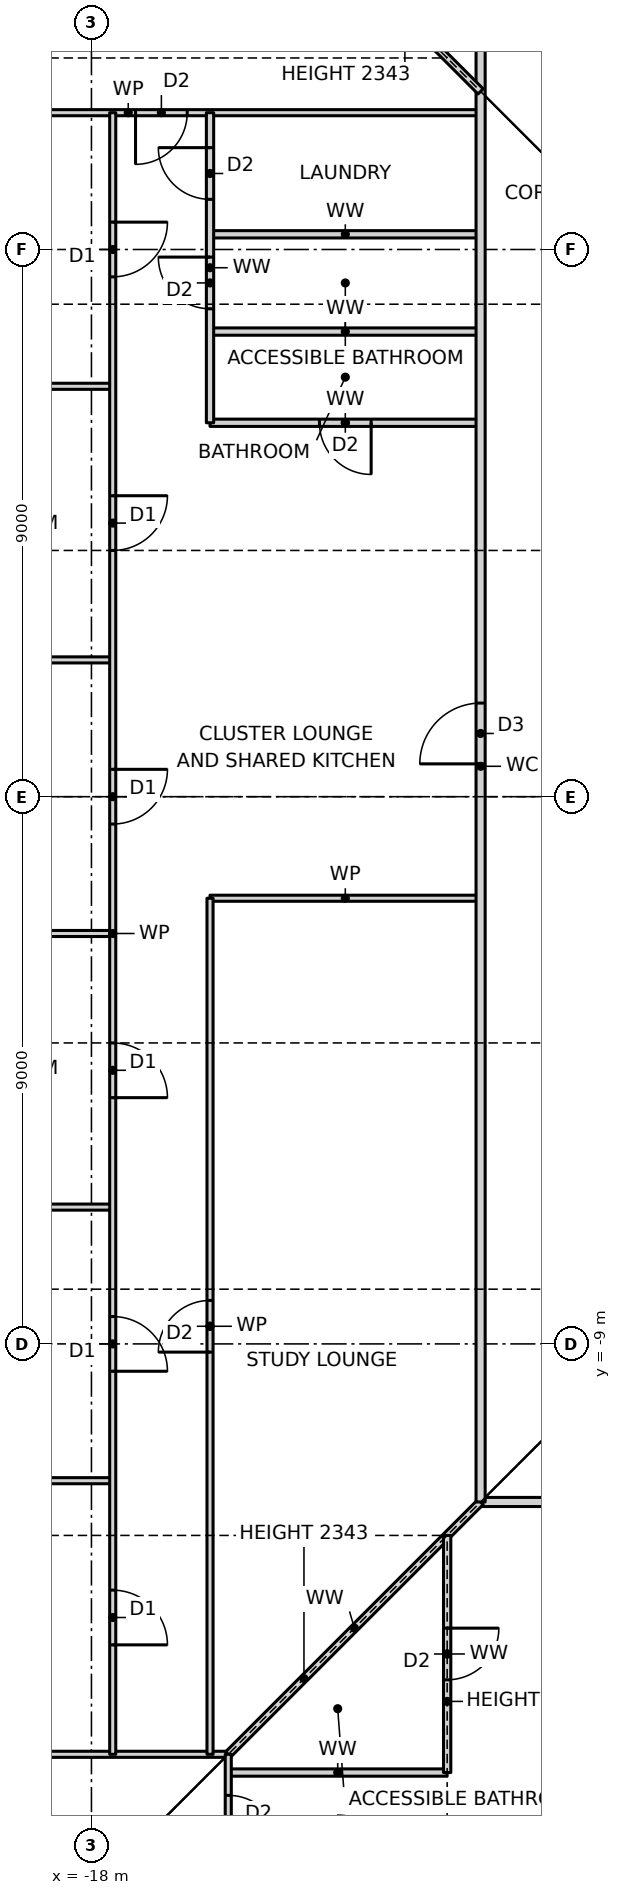
"""IFC4 building model, lengths in metres.
Left out: names, types, materials, properties, quantities, classifications, styles, units other than length and angle.
Written with IfcOpenShell. Run it as: python <this file> out.ifc"""

import sys

from ifc_helpers import new_model, si_unit, direction, frame, frame_2d, origin, place, context, subcontext, project, spatial, rectangle, extrude, element, fill, save


model = new_model("IFC4")
c1 = context("Model", 3, precision=1e-05, world=origin(), true_north=direction((0.0, 1.0)))
c2 = subcontext(c1, "Body", "Model", "MODEL_VIEW")
j1 = project(units=[si_unit("LENGTHUNIT", "METRE"), si_unit("PLANEANGLEUNIT", "RADIAN")], contexts=[c1])
p1 = place(None, origin())
s1 = spatial("IfcSite", under=j1, at=p1, CompositionType="ELEMENT")
p2 = place(p1, origin())
s2 = spatial("IfcBuilding", under=s1, at=p2, CompositionType="ELEMENT")
p3 = place(p2, frame((0.0, 0.0, 36.0)))
s3 = spatial("IfcBuildingStorey", under=s2, at=p3, CompositionType="ELEMENT", Elevation=36.0)
p4 = place(p3, frame((-15.75, -16.05, 0.0), z_axis=(0.0, 0.0, 1.0), x_axis=(1.0, 0.0, 0.0)))
e1 = element("IfcWall", 1, at=p4, inside=s3, PredefinedType="PARTITIONING", context=c2, shape_type="SweptSolid", body=[
    extrude(rectangle(XDim=3.6, YDim=0.12, at=frame_2d((1.8, 0.0))), origin(), (0.0, 0.0, 1.0), 3.27),
])
p5 = place(p3, frame((-23.19, -15.75, 0.0), z_axis=(0.0, 0.0, 1.0), x_axis=(1.0, 0.0, 0.0)))
e2 = element("IfcWall", 2, at=p5, inside=s3, PredefinedType="PARTITIONING", context=c2, shape_type="SweptSolid", body=[
    extrude(rectangle(XDim=7.44, YDim=0.1, at=frame_2d((3.72, 0.0))), origin(), (0.0, 0.0, 1.0), 3.27),
])
p6 = place(p3, frame((-11.6, -11.6, 0.0), z_axis=(0.0, 0.0, 1.0), x_axis=(1.0, 0.0, 0.0)))
e3 = element("IfcWall", 3, at=p6, inside=s3, PredefinedType="PARTITIONING", context=c2, shape_type="SweptSolid", body=[
    extrude(rectangle(XDim=23.2, YDim=0.15, at=frame_2d((11.6, 0.0))), origin(), (0.0, 0.0, 1.0), 3.27),
])
p7 = place(p6, frame((2.975, 0.0, 0.0)))
e4 = element("IfcOpeningElement", 4, at=p7, cuts=e3, PredefinedType="OPENING", context=c2, shape_type="SweptSolid", body=[
    extrude(rectangle(XDim=1.0, YDim=2.1, at=frame_2d((0.5, 1.05))), frame((0.0, 0.085, 0.0), z_axis=(0.0, -1.0, 0.0), x_axis=(1.0, 0.0, 0.0)), (0.0, 0.0, 1.0), 0.17),
])
p8 = place(p6, frame((18.6, 0.0, 0.0)))
e5 = element("IfcOpeningElement", 5, at=p8, cuts=e3, PredefinedType="OPENING", context=c2, shape_type="SweptSolid", body=[
    extrude(rectangle(XDim=1.0, YDim=2.1, at=frame_2d((0.5, 1.05))), frame((0.0, 0.085, 0.0), z_axis=(0.0, -1.0, 0.0), x_axis=(1.0, 0.0, 0.0)), (0.0, 0.0, 1.0), 0.17),
])
for number, where, z_axis, x_axis in (
    (6, (-23.19, -11.25, 0.0), (0.0, 0.0, 1.0), (1.0, 0.0, 0.0)),
    (7, (-23.19, -6.75, 0.0), (0.0, 0.0, 1.0), (1.0, 0.0, 0.0)),
    (8, (-23.19, -2.25, 0.0), (0.0, 0.0, 1.0), (1.0, 0.0, 0.0)),
):
    element("IfcWall", number, at=place(p3, frame(where, z_axis=z_axis, x_axis=x_axis)), inside=s3, PredefinedType="PARTITIONING", context=c2, shape_type="SweptSolid", body=[
        extrude(rectangle(XDim=5.54, YDim=0.1, at=frame_2d((2.77, 0.0))), origin(), (0.0, 0.0, 1.0), 3.27),
    ])
p9 = place(p3, frame((-16.05, -1.67, 0.0), z_axis=(0.0, 0.0, 1.0), x_axis=(1.0, 0.0, 0.0)))
e9 = element("IfcWall", 9, at=p9, inside=s3, PredefinedType="PARTITIONING", context=c2, shape_type="SweptSolid", body=[
    extrude(rectangle(XDim=4.45, YDim=0.1, at=frame_2d((2.225, 0.0))), origin(), (0.0, 0.0, 1.0), 3.27),
])
p10 = place(p3, frame((-23.19, 2.25, 0.0), z_axis=(0.0, 0.0, 1.0), x_axis=(1.0, 0.0, 0.0)))
e10 = element("IfcWall", 10, at=p10, inside=s3, PredefinedType="PARTITIONING", context=c2, shape_type="SweptSolid", body=[
    extrude(rectangle(XDim=5.54, YDim=0.1, at=frame_2d((2.77, 0.0))), origin(), (0.0, 0.0, 1.0), 3.27),
])
p11 = place(p3, frame((-16.05, 6.15, 0.0), z_axis=(0.0, 0.0, 1.0), x_axis=(1.0, 0.0, 0.0)))
e11 = element("IfcWall", 11, at=p11, inside=s3, PredefinedType="PARTITIONING", context=c2, shape_type="SweptSolid", body=[
    extrude(rectangle(XDim=4.45, YDim=0.12, at=frame_2d((2.225, 0.0))), origin(), (0.0, 0.0, 1.0), 3.27),
])
p12 = place(p11, frame((1.8, 0.0, 0.0)))
e12 = element("IfcOpeningElement", 12, at=p12, cuts=e11, PredefinedType="OPENING", context=c2, shape_type="SweptSolid", body=[
    extrude(rectangle(XDim=0.85, YDim=2.1, at=frame_2d((0.425, 1.05))), frame((0.0, 0.07, 0.0), z_axis=(0.0, -1.0, 0.0), x_axis=(1.0, 0.0, 0.0)), (0.0, 0.0, 1.0), 0.14),
])
p13 = place(p3, frame((-23.19, 6.75, 0.0), z_axis=(0.0, 0.0, 1.0), x_axis=(1.0, 0.0, 0.0)))
e13 = element("IfcWall", 13, at=p13, inside=s3, PredefinedType="PARTITIONING", context=c2, shape_type="SweptSolid", body=[
    extrude(rectangle(XDim=5.54, YDim=0.1, at=frame_2d((2.77, 0.0))), origin(), (0.0, 0.0, 1.0), 3.27),
])
for number, where, z_axis, x_axis in (
    (14, (-16.05, 7.65, 0.0), (0.0, 0.0, 1.0), (1.0, 0.0, 0.0)),
    (15, (-16.05, 9.25, 0.0), (0.0, 0.0, 1.0), (1.0, 0.0, 0.0)),
):
    element("IfcWall", number, at=place(p3, frame(where, z_axis=z_axis, x_axis=x_axis)), inside=s3, PredefinedType="PARTITIONING", context=c2, shape_type="SweptSolid", body=[
        extrude(rectangle(XDim=4.45, YDim=0.12, at=frame_2d((2.225, 0.0))), origin(), (0.0, 0.0, 1.0), 3.27),
    ])
p14 = place(p3, frame((-23.19, 11.25, 0.0), z_axis=(0.0, 0.0, 1.0), x_axis=(1.0, 0.0, 0.0)))
e16 = element("IfcWall", 16, at=p14, inside=s3, PredefinedType="PARTITIONING", context=c2, shape_type="SweptSolid", body=[
    extrude(rectangle(XDim=11.59, YDim=0.1, at=frame_2d((5.795, 0.0))), origin(), (0.0, 0.0, 1.0), 3.27),
])
p15 = place(p14, frame((5.915, 0.0, 0.0)))
e17 = element("IfcOpeningElement", 17, at=p15, cuts=e16, PredefinedType="OPENING", context=c2, shape_type="SweptSolid", body=[
    extrude(rectangle(XDim=0.85, YDim=2.1, at=frame_2d((0.425, 1.05))), frame((0.0, 0.06, 0.0), z_axis=(0.0, -1.0, 0.0), x_axis=(1.0, 0.0, 0.0)), (0.0, 0.0, 1.0), 0.12),
])
p16 = place(p3, frame((-15.75, -15.75, 0.0), z_axis=(0.0, 0.0, 1.0), x_axis=(0.707106781187, 0.707106781187, 0.0)))
e18 = element("IfcWall", 18, at=p16, inside=s3, PredefinedType="PARTITIONING", context=c2, shape_type="SweptSolid", body=[
    extrude(rectangle(XDim=5.869, YDim=0.12, at=frame_2d((2.935, 0.0))), origin(), (0.0, 0.0, 1.0), 2.343),
])
p17 = place(p3, frame((-11.6, -11.6, 0.0), z_axis=(0.0, 0.0, 1.0), x_axis=(0.0, 1.0, 0.0)))
e19 = element("IfcWall", 19, at=p17, inside=s3, PredefinedType="PARTITIONING", context=c2, shape_type="SweptSolid", body=[
    extrude(rectangle(XDim=24.2, YDim=0.15, at=frame_2d((12.1, 0.0))), origin(), (0.0, 0.0, 1.0), 3.27),
])
p18 = place(p17, frame((12.14, 0.0, 0.0)))
e20 = element("IfcOpeningElement", 20, at=p18, cuts=e19, PredefinedType="OPENING", context=c2, shape_type="SweptSolid", body=[
    extrude(rectangle(XDim=1.0, YDim=2.1, at=frame_2d((0.5, 1.05))), frame((0.0, 0.085, 0.0), z_axis=(0.0, -1.0, 0.0), x_axis=(1.0, 0.0, 0.0)), (0.0, 0.0, 1.0), 0.17),
])
p19 = place(p3, frame((-12.15, -16.05, 0.0), z_axis=(0.0, 0.0, 1.0), x_axis=(0.0, 1.0, 0.0)))
e21 = element("IfcWall", 21, at=p19, inside=s3, PredefinedType="PARTITIONING", context=c2, shape_type="SweptSolid", body=[
    extrude(rectangle(XDim=3.9, YDim=0.12, at=frame_2d((1.95, 0.0))), origin(), (0.0, 0.0, 1.0), 2.508),
])
p20 = place(p19, frame((1.525, 0.0, 0.0)))
e22 = element("IfcOpeningElement", 22, at=p20, cuts=e21, PredefinedType="OPENING", context=c2, shape_type="SweptSolid", body=[
    extrude(rectangle(XDim=0.85, YDim=2.1, at=frame_2d((0.425, 1.05))), frame((0.0, 0.07, 0.0), z_axis=(0.0, -1.0, 0.0), x_axis=(1.0, 0.0, 0.0)), (0.0, 0.0, 1.0), 0.14),
])
p21 = place(p3, frame((-15.75, -23.19, 0.0), z_axis=(0.0, 0.0, 1.0), x_axis=(0.0, 1.0, 0.0)))
e23 = element("IfcWall", 23, at=p21, inside=s3, PredefinedType="PARTITIONING", context=c2, shape_type="SweptSolid", body=[
    extrude(rectangle(XDim=7.44, YDim=0.1, at=frame_2d((3.72, 0.0))), origin(), (0.0, 0.0, 1.0), 3.27),
])
p22 = place(p21, frame((5.915, 0.0, 0.0)))
e24 = element("IfcOpeningElement", 24, at=p22, cuts=e23, PredefinedType="OPENING", context=c2, shape_type="SweptSolid", body=[
    extrude(rectangle(XDim=0.85, YDim=2.1, at=frame_2d((0.425, 1.05))), frame((0.0, 0.06, 0.0), z_axis=(0.0, -1.0, 0.0), x_axis=(1.0, 0.0, 0.0)), (0.0, 0.0, 1.0), 0.12),
])
p23 = place(p3, frame((-16.05, -15.75, 0.0), z_axis=(0.0, 0.0, 1.0), x_axis=(0.0, 1.0, 0.0)))
e25 = element("IfcWall", 25, at=p23, inside=s3, PredefinedType="PARTITIONING", context=c2, shape_type="SweptSolid", body=[
    extrude(rectangle(XDim=14.08, YDim=0.1, at=frame_2d((7.04, 0.0))), origin(), (0.0, 0.0, 1.0), 3.27),
])
p24 = place(p23, frame((6.615, 0.0, 0.0)))
e26 = element("IfcOpeningElement", 26, at=p24, cuts=e25, PredefinedType="OPENING", context=c2, shape_type="SweptSolid", body=[
    extrude(rectangle(XDim=0.85, YDim=2.1, at=frame_2d((0.425, 1.05))), frame((0.0, 0.06, 0.0), z_axis=(0.0, -1.0, 0.0), x_axis=(1.0, 0.0, 0.0)), (0.0, 0.0, 1.0), 0.12),
])
p25 = place(p3, frame((-16.05, 6.15, 0.0), z_axis=(0.0, 0.0, 1.0), x_axis=(0.0, 1.0, 0.0)))
e27 = element("IfcWall", 27, at=p25, inside=s3, PredefinedType="PARTITIONING", context=c2, shape_type="SweptSolid", body=[
    extrude(rectangle(XDim=5.1, YDim=0.12, at=frame_2d((2.55, 0.0))), origin(), (0.0, 0.0, 1.0), 3.27),
])
p26 = place(p25, frame((3.675, 0.0, 0.0)))
e28 = element("IfcOpeningElement", 28, at=p26, cuts=e27, PredefinedType="OPENING", context=c2, shape_type="SweptSolid", body=[
    extrude(rectangle(XDim=0.85, YDim=2.1, at=frame_2d((0.425, 1.05))), frame((0.0, 0.07, 0.0), z_axis=(0.0, -1.0, 0.0), x_axis=(1.0, 0.0, 0.0)), (0.0, 0.0, 1.0), 0.14),
])
p27 = place(p25, frame((1.875, 0.0, 0.0)))
e29 = element("IfcOpeningElement", 29, at=p27, cuts=e27, PredefinedType="OPENING", context=c2, shape_type="SweptSolid", body=[
    extrude(rectangle(XDim=0.85, YDim=2.1, at=frame_2d((0.425, 1.05))), frame((0.0, 0.07, 0.0), z_axis=(0.0, -1.0, 0.0), x_axis=(1.0, 0.0, 0.0)), (0.0, 0.0, 1.0), 0.14),
])
p28 = place(p3, frame((-17.65, -15.75, 0.0), z_axis=(0.0, 0.0, 1.0), x_axis=(0.0, 1.0, 0.0)))
e30 = element("IfcWall", 30, at=p28, inside=s3, PredefinedType="PARTITIONING", context=c2, shape_type="SweptSolid", body=[
    extrude(rectangle(XDim=27.0, YDim=0.1, at=frame_2d((13.5, 0.0))), origin(), (0.0, 0.0, 1.0), 3.27),
])
p29 = place(p28, frame((24.3, 0.0, 0.0)))
e31 = element("IfcOpeningElement", 31, at=p29, cuts=e30, PredefinedType="OPENING", context=c2, shape_type="SweptSolid", body=[
    extrude(rectangle(XDim=0.9, YDim=2.1, at=frame_2d((0.45, 1.05))), frame((0.0, 0.06, 0.0), z_axis=(0.0, -1.0, 0.0), x_axis=(1.0, 0.0, 0.0)), (0.0, 0.0, 1.0), 0.12),
])
p30 = place(p28, frame((19.8, 0.0, 0.0)))
e32 = element("IfcOpeningElement", 32, at=p30, cuts=e30, PredefinedType="OPENING", context=c2, shape_type="SweptSolid", body=[
    extrude(rectangle(XDim=0.9, YDim=2.1, at=frame_2d((0.45, 1.05))), frame((0.0, 0.06, 0.0), z_axis=(0.0, -1.0, 0.0), x_axis=(1.0, 0.0, 0.0)), (0.0, 0.0, 1.0), 0.12),
])
p31 = place(p28, frame((15.3, 0.0, 0.0)))
e33 = element("IfcOpeningElement", 33, at=p31, cuts=e30, PredefinedType="OPENING", context=c2, shape_type="SweptSolid", body=[
    extrude(rectangle(XDim=0.9, YDim=2.1, at=frame_2d((0.45, 1.05))), frame((0.0, 0.06, 0.0), z_axis=(0.0, -1.0, 0.0), x_axis=(1.0, 0.0, 0.0)), (0.0, 0.0, 1.0), 0.12),
])
p32 = place(p28, frame((10.8, 0.0, 0.0)))
e34 = element("IfcOpeningElement", 34, at=p32, cuts=e30, PredefinedType="OPENING", context=c2, shape_type="SweptSolid", body=[
    extrude(rectangle(XDim=0.9, YDim=2.1, at=frame_2d((0.45, 1.05))), frame((0.0, 0.06, 0.0), z_axis=(0.0, -1.0, 0.0), x_axis=(1.0, 0.0, 0.0)), (0.0, 0.0, 1.0), 0.12),
])
p33 = place(p28, frame((6.3, 0.0, 0.0)))
e35 = element("IfcOpeningElement", 35, at=p33, cuts=e30, PredefinedType="OPENING", context=c2, shape_type="SweptSolid", body=[
    extrude(rectangle(XDim=0.9, YDim=2.1, at=frame_2d((0.45, 1.05))), frame((0.0, 0.06, 0.0), z_axis=(0.0, -1.0, 0.0), x_axis=(1.0, 0.0, 0.0)), (0.0, 0.0, 1.0), 0.12),
])
p34 = place(p28, frame((1.8, 0.0, 0.0)))
e36 = element("IfcOpeningElement", 36, at=p34, cuts=e30, PredefinedType="OPENING", context=c2, shape_type="SweptSolid", body=[
    extrude(rectangle(XDim=0.9, YDim=2.1, at=frame_2d((0.45, 1.05))), frame((0.0, 0.06, 0.0), z_axis=(0.0, -1.0, 0.0), x_axis=(1.0, 0.0, 0.0)), (0.0, 0.0, 1.0), 0.12),
])
p35 = place(p3, frame((-11.6, 11.6, 0.0), z_axis=(0.0, 0.0, 1.0), x_axis=(-0.707106781187, 0.707106781187, 0.0)))
e37 = element("IfcWall", 37, at=p35, inside=s3, PredefinedType="PARTITIONING", context=c2, shape_type="SweptSolid", body=[
    extrude(rectangle(XDim=5.869, YDim=0.12, at=frame_2d((2.935, 0.0))), origin(), (0.0, 0.0, 1.0), 2.343),
])
p36 = place(p20, frame((0.85, 0.0, 0.0), z_axis=(0.0, 0.0, 1.0), x_axis=(-1.0, 0.0, 0.0)))
e38 = element("IfcDoor", 38, at=p36, inside=s3, OperationType="SINGLE_SWING_LEFT", PredefinedType="DOOR", context=c2, shape_type="SweptSolid", body=[
    extrude(rectangle(XDim=0.85, YDim=2.1, at=frame_2d((0.425, 1.05))), frame((0.0, 0.025, 0.0), z_axis=(0.0, -1.0, 0.0), x_axis=(1.0, 0.0, 0.0)), (0.0, 0.0, 1.0), 0.05),
])
fill(e22, e38)
p37 = place(p15, frame((0.85, 0.0, 0.0), z_axis=(0.0, 0.0, 1.0), x_axis=(-1.0, 0.0, 0.0)))
e39 = element("IfcDoor", 39, at=p37, inside=s3, OperationType="SINGLE_SWING_RIGHT", PredefinedType="DOOR", context=c2, shape_type="SweptSolid", body=[
    extrude(rectangle(XDim=0.85, YDim=2.1, at=frame_2d((0.425, 1.05))), frame((0.0, 0.025, 0.0), z_axis=(0.0, -1.0, 0.0), x_axis=(1.0, 0.0, 0.0)), (0.0, 0.0, 1.0), 0.05),
])
fill(e17, e39)
p38 = place(p29, frame((0.9, 0.0, 0.0), z_axis=(0.0, 0.0, 1.0), x_axis=(-1.0, 0.0, 0.0)))
e40 = element("IfcDoor", 40, at=p38, inside=s3, OperationType="SINGLE_SWING_LEFT", PredefinedType="DOOR", context=c2, shape_type="SweptSolid", body=[
    extrude(rectangle(XDim=0.9, YDim=2.1, at=frame_2d((0.45, 1.05))), frame((0.0, 0.025, 0.0), z_axis=(0.0, -1.0, 0.0), x_axis=(1.0, 0.0, 0.0)), (0.0, 0.0, 1.0), 0.05),
])
fill(e31, e40)
p39 = place(p30, frame((0.9, 0.0, 0.0), z_axis=(0.0, 0.0, 1.0), x_axis=(-1.0, 0.0, 0.0)))
e41 = element("IfcDoor", 41, at=p39, inside=s3, OperationType="SINGLE_SWING_LEFT", PredefinedType="DOOR", context=c2, shape_type="SweptSolid", body=[
    extrude(rectangle(XDim=0.9, YDim=2.1, at=frame_2d((0.45, 1.05))), frame((0.0, 0.025, 0.0), z_axis=(0.0, -1.0, 0.0), x_axis=(1.0, 0.0, 0.0)), (0.0, 0.0, 1.0), 0.05),
])
fill(e32, e41)
p40 = place(p31, frame((0.9, 0.0, 0.0), z_axis=(0.0, 0.0, 1.0), x_axis=(-1.0, 0.0, 0.0)))
e42 = element("IfcDoor", 42, at=p40, inside=s3, OperationType="SINGLE_SWING_LEFT", PredefinedType="DOOR", context=c2, shape_type="SweptSolid", body=[
    extrude(rectangle(XDim=0.9, YDim=2.1, at=frame_2d((0.45, 1.05))), frame((0.0, 0.025, 0.0), z_axis=(0.0, -1.0, 0.0), x_axis=(1.0, 0.0, 0.0)), (0.0, 0.0, 1.0), 0.05),
])
fill(e33, e42)
p41 = place(p32, frame((0.9, 0.0, 0.0), z_axis=(0.0, 0.0, 1.0), x_axis=(-1.0, 0.0, 0.0)))
e43 = element("IfcDoor", 43, at=p41, inside=s3, OperationType="SINGLE_SWING_RIGHT", PredefinedType="DOOR", context=c2, shape_type="SweptSolid", body=[
    extrude(rectangle(XDim=0.9, YDim=2.1, at=frame_2d((0.45, 1.05))), frame((0.0, 0.025, 0.0), z_axis=(0.0, -1.0, 0.0), x_axis=(1.0, 0.0, 0.0)), (0.0, 0.0, 1.0), 0.05),
])
fill(e34, e43)
p42 = place(p33, frame((0.9, 0.0, 0.0), z_axis=(0.0, 0.0, 1.0), x_axis=(-1.0, 0.0, 0.0)))
e44 = element("IfcDoor", 44, at=p42, inside=s3, OperationType="SINGLE_SWING_RIGHT", PredefinedType="DOOR", context=c2, shape_type="SweptSolid", body=[
    extrude(rectangle(XDim=0.9, YDim=2.1, at=frame_2d((0.45, 1.05))), frame((0.0, 0.025, 0.0), z_axis=(0.0, -1.0, 0.0), x_axis=(1.0, 0.0, 0.0)), (0.0, 0.0, 1.0), 0.05),
])
fill(e35, e44)
p43 = place(p34, frame((0.9, 0.0, 0.0), z_axis=(0.0, 0.0, 1.0), x_axis=(-1.0, 0.0, 0.0)))
e45 = element("IfcDoor", 45, at=p43, inside=s3, OperationType="SINGLE_SWING_RIGHT", PredefinedType="DOOR", context=c2, shape_type="SweptSolid", body=[
    extrude(rectangle(XDim=0.9, YDim=2.1, at=frame_2d((0.45, 1.05))), frame((0.0, 0.025, 0.0), z_axis=(0.0, -1.0, 0.0), x_axis=(1.0, 0.0, 0.0)), (0.0, 0.0, 1.0), 0.05),
])
fill(e36, e45)
p44 = place(p18, origin())
e46 = element("IfcDoor", 46, at=p44, inside=s3, OperationType="SINGLE_SWING_LEFT", PredefinedType="DOOR", context=c2, shape_type="SweptSolid", body=[
    extrude(rectangle(XDim=1.0, YDim=2.1, at=frame_2d((0.5, 1.05))), frame((0.0, 0.025, 0.0), z_axis=(0.0, -1.0, 0.0), x_axis=(1.0, 0.0, 0.0)), (0.0, 0.0, 1.0), 0.05),
])
fill(e20, e46)
p45 = place(p26, origin())
e47 = element("IfcDoor", 47, at=p45, inside=s3, OperationType="SINGLE_SWING_RIGHT", PredefinedType="DOOR", context=c2, shape_type="SweptSolid", body=[
    extrude(rectangle(XDim=0.85, YDim=2.1, at=frame_2d((0.425, 1.05))), frame((0.0, 0.025, 0.0), z_axis=(0.0, -1.0, 0.0), x_axis=(1.0, 0.0, 0.0)), (0.0, 0.0, 1.0), 0.05),
])
fill(e28, e47)
p46 = place(p27, origin())
e48 = element("IfcDoor", 48, at=p46, inside=s3, OperationType="SINGLE_SWING_RIGHT", PredefinedType="DOOR", context=c2, shape_type="SweptSolid", body=[
    extrude(rectangle(XDim=0.85, YDim=2.1, at=frame_2d((0.425, 1.05))), frame((0.0, 0.025, 0.0), z_axis=(0.0, -1.0, 0.0), x_axis=(1.0, 0.0, 0.0)), (0.0, 0.0, 1.0), 0.05),
])
fill(e29, e48)
p47 = place(p12, frame((0.85, 0.0, 0.0), z_axis=(0.0, 0.0, 1.0), x_axis=(-1.0, 0.0, 0.0)))
e49 = element("IfcDoor", 49, at=p47, inside=s3, OperationType="SINGLE_SWING_LEFT", PredefinedType="DOOR", context=c2, shape_type="SweptSolid", body=[
    extrude(rectangle(XDim=0.85, YDim=2.1, at=frame_2d((0.425, 1.05))), frame((0.0, 0.025, 0.0), z_axis=(0.0, -1.0, 0.0), x_axis=(1.0, 0.0, 0.0)), (0.0, 0.0, 1.0), 0.05),
])
fill(e12, e49)
p48 = place(p24, origin())
e50 = element("IfcDoor", 50, at=p48, inside=s3, OperationType="SINGLE_SWING_LEFT", PredefinedType="DOOR", context=c2, shape_type="SweptSolid", body=[
    extrude(rectangle(XDim=0.85, YDim=2.1, at=frame_2d((0.425, 1.05))), frame((0.0, 0.025, 0.0), z_axis=(0.0, -1.0, 0.0), x_axis=(1.0, 0.0, 0.0)), (0.0, 0.0, 1.0), 0.05),
])
fill(e26, e50)
p49 = place(p22, frame((0.85, 0.0, 0.0), z_axis=(0.0, 0.0, 1.0), x_axis=(-1.0, 0.0, 0.0)))
e51 = element("IfcDoor", 51, at=p49, inside=s3, OperationType="SINGLE_SWING_RIGHT", PredefinedType="DOOR", context=c2, shape_type="SweptSolid", body=[
    extrude(rectangle(XDim=0.85, YDim=2.1, at=frame_2d((0.425, 1.05))), frame((0.0, 0.025, 0.0), z_axis=(0.0, -1.0, 0.0), x_axis=(1.0, 0.0, 0.0)), (0.0, 0.0, 1.0), 0.05),
])
fill(e24, e51)
save(model, sys.argv[1])
